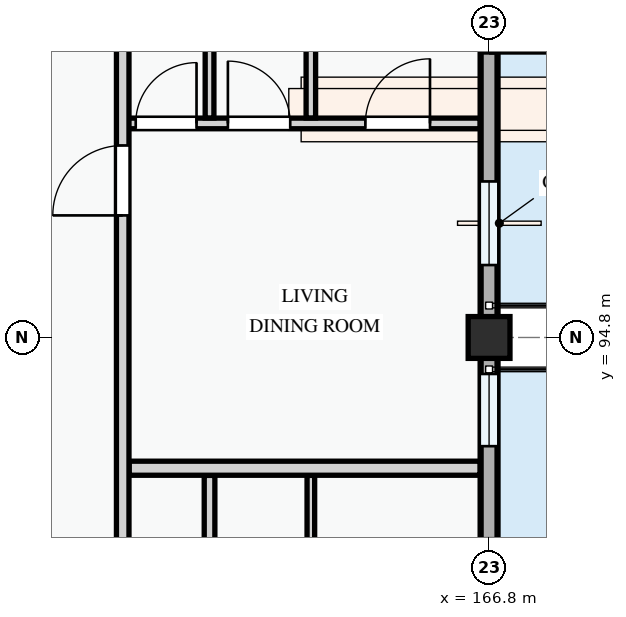
"""IFC4 building model, lengths in metres.
Left out: names, types, materials, properties, quantities, classifications, styles, units other than length and angle.
Written with IfcOpenShell. Run it as: python <this file> out.ifc"""

import sys

from ifc_helpers import new_model, si_unit, direction, frame, frame_2d, origin, origin_2d, place, context, subcontext, project, spatial, polyline, rectangle, outline, extrude, element, fill, save


model = new_model("IFC4")
c1 = context("Model", 3, precision=1e-05, world=origin(), true_north=direction((0.0, 1.0)))
c2 = subcontext(c1, "Body", "Model", "MODEL_VIEW")
j1 = project(units=[si_unit("LENGTHUNIT", "METRE"), si_unit("PLANEANGLEUNIT", "RADIAN")], contexts=[c1])
p1 = place(None, origin())
s1 = spatial("IfcSite", under=j1, at=p1, CompositionType="ELEMENT")
p2 = place(p1, origin())
s2 = spatial("IfcBuilding", under=s1, at=p2, CompositionType="ELEMENT")
p3 = place(p2, frame((0.0, 0.0, 41.1)))
s3 = spatial("IfcBuildingStorey", under=s2, at=p3, CompositionType="ELEMENT", Elevation=41.1)
p4 = place(p3, frame((166.8, 94.8, 0.0), z_axis=(0.0, 0.0, 1.0), x_axis=(1.0, 0.0, 0.0)))
e1 = element("IfcColumn", 1, at=p4, inside=s3, PredefinedType="COLUMN", context=c2, shape_type="SweptSolid", body=[
    extrude(rectangle(XDim=0.55, YDim=0.55, at=origin_2d()), origin(), (0.0, 0.0, 1.0), 3.3),
])
p5 = place(p3, frame((166.8, 86.4, 0.0), z_axis=(0.0, 0.0, 1.0), x_axis=(0.0, 1.0, 0.0)))
e2 = element("IfcWall", 2, at=p5, inside=s3, PredefinedType="STANDARD", context=c2, shape_type="SweptSolid", body=[
    extrude(rectangle(XDim=8.4, YDim=0.235, at=frame_2d((4.2, 0.0))), origin(), (0.0, 0.0, 1.0), 2.345),
])
p6 = place(p5, frame((4.159, 0.0, 0.0)))
e3 = element("IfcOpeningElement", 3, at=p6, cuts=e2, PredefinedType="OPENING", context=c2, shape_type="SweptSolid", body=[
    extrude(rectangle(XDim=1.6, YDim=2.2, at=frame_2d((0.8, 1.1))), frame((0.0, 0.127, 0.0), z_axis=(0.0, -1.0, 0.0), x_axis=(1.0, 0.0, 0.0)), (0.0, 0.0, 1.0), 0.255),
])
p7 = place(p5, frame((1.064, 0.0, 0.78)))
e4 = element("IfcOpeningElement", 4, at=p7, cuts=e2, PredefinedType="OPENING", context=c2, shape_type="SweptSolid", body=[
    extrude(rectangle(XDim=1.3, YDim=1.4, at=frame_2d((0.65, 0.7))), frame((0.0, 0.127, 0.0), z_axis=(0.0, -1.0, 0.0), x_axis=(1.0, 0.0, 0.0)), (0.0, 0.0, 1.0), 0.255),
])
p8 = place(p5, frame((6.97, 0.0, 0.78)))
e5 = element("IfcOpeningElement", 5, at=p8, cuts=e2, PredefinedType="OPENING", context=c2, shape_type="SweptSolid", body=[
    extrude(rectangle(XDim=0.95, YDim=1.15, at=frame_2d((0.475, 0.575))), frame((0.0, 0.127, 0.0), z_axis=(0.0, -1.0, 0.0), x_axis=(1.0, 0.0, 0.0)), (0.0, 0.0, 1.0), 0.255),
])
p9 = place(p3, frame((166.8, 94.8, 0.0), z_axis=(0.0, 0.0, 1.0), x_axis=(0.0, 1.0, 0.0)))
e6 = element("IfcWall", 6, at=p9, inside=s3, PredefinedType="STANDARD", context=c2, shape_type="SweptSolid", body=[
    extrude(rectangle(XDim=6.0, YDim=0.235, at=frame_2d((3.0, 0.0))), origin(), (0.0, 0.0, 1.0), 2.445),
])
p10 = place(p9, frame((3.738, 0.0, 0.0)))
e7 = element("IfcOpeningElement", 7, at=p10, cuts=e6, PredefinedType="OPENING", context=c2, shape_type="SweptSolid", body=[
    extrude(rectangle(XDim=1.05, YDim=2.15, at=frame_2d((0.525, 1.075))), frame((0.0, 0.127, 0.0), z_axis=(0.0, -1.0, 0.0), x_axis=(1.0, 0.0, 0.0)), (0.0, 0.0, 1.0), 0.255),
])
p11 = place(p9, frame((0.953, 0.0, 0.78)))
e8 = element("IfcOpeningElement", 8, at=p11, cuts=e6, PredefinedType="OPENING", context=c2, shape_type="SweptSolid", body=[
    extrude(rectangle(XDim=1.1, YDim=1.3, at=frame_2d((0.55, 0.65))), frame((0.0, 0.127, 0.0), z_axis=(0.0, -1.0, 0.0), x_axis=(1.0, 0.0, 0.0)), (0.0, 0.0, 1.0), 0.255),
])
p12 = place(p3, frame((166.8, 86.4, 3.3), z_axis=(0.0, 0.0, 1.0), x_axis=(0.0, 1.0, 0.0)))
e9 = element("IfcWall", 9, at=p12, inside=s3, PredefinedType="PARAPET", context=c2, shape_type="SweptSolid", body=[
    extrude(outline(polyline([(0.0, 0.0), (8.4, 0.0), (8.4, 1.12), (7.7, 1.322), (7.0, 1.485), (6.3, 1.618), (5.6, 1.718), (4.9, 1.779), (4.2, 1.8), (3.5, 1.779), (2.8, 1.718), (2.1, 1.618), (1.4, 1.485), (0.7, 1.322), (0.0, 1.12), (0.0, 0.0)])), frame((0.0, 0.105, 0.0), z_axis=(0.0, -1.0, 0.0), x_axis=(1.0, 0.0, 0.0)), (0.0, 0.0, 1.0), 0.21),
])
p13 = place(p3, frame((166.8, 94.8, 3.3), z_axis=(0.0, 0.0, 1.0), x_axis=(0.0, 1.0, 0.0)))
e10 = element("IfcWall", 10, at=p13, inside=s3, PredefinedType="PARAPET", context=c2, shape_type="SweptSolid", body=[
    extrude(outline(polyline([(0.0, 0.0), (6.0, 0.0), (6.0, 1.12), (5.5, 1.322), (5.0, 1.485), (4.5, 1.618), (4.0, 1.718), (3.5, 1.779), (3.0, 1.8), (2.5, 1.779), (2.0, 1.718), (1.5, 1.618), (1.0, 1.485), (0.5, 1.322), (0.0, 1.12), (0.0, 0.0)])), frame((0.0, 0.105, 0.0), z_axis=(0.0, -1.0, 0.0), x_axis=(1.0, 0.0, 0.0)), (0.0, 0.0, 1.0), 0.21),
])
p14 = place(p3, frame((164.455, 89.697, 0.0), z_axis=(0.0, 0.0, 1.0), x_axis=(0.0, 1.0, 0.0)))
e11 = element("IfcWall", 11, at=p14, inside=s3, PredefinedType="PARTITIONING", context=c2, shape_type="SweptSolid", body=[
    extrude(rectangle(XDim=3.289, YDim=0.1, at=frame_2d((1.644, 0.0))), origin(), (0.0, 0.0, 1.0), 3.0),
])
p15 = place(p3, frame((163.122, 89.697, 0.0), z_axis=(0.0, 0.0, 1.0), x_axis=(0.0, 1.0, 0.0)))
e12 = element("IfcWall", 12, at=p15, inside=s3, PredefinedType="PARTITIONING", context=c2, shape_type="SweptSolid", body=[
    extrude(rectangle(XDim=3.289, YDim=0.14, at=frame_2d((1.644, 0.0))), origin(), (0.0, 0.0, 1.0), 3.0),
])
p16 = place(p3, frame((161.98, 97.616, 0.0), z_axis=(0.0, 0.0, 1.0), x_axis=(1.0, 0.0, 0.0)))
e13 = element("IfcWall", 13, at=p16, inside=s3, PredefinedType="PARTITIONING", context=c2, shape_type="SweptSolid", body=[
    extrude(rectangle(XDim=4.7, YDim=0.14, at=frame_2d((2.35, 0.0))), origin(), (0.0, 0.0, 1.0), 3.0),
])
p17 = place(p16, frame((0.171, 0.0, 0.0)))
e14 = element("IfcOpeningElement", 14, at=p17, cuts=e13, PredefinedType="OPENING", context=c2, shape_type="SweptSolid", body=[
    extrude(rectangle(XDim=0.8, YDim=2.1, at=frame_2d((0.4, 1.05))), frame((0.0, 0.08, 0.0), z_axis=(0.0, -1.0, 0.0), x_axis=(1.0, 0.0, 0.0)), (0.0, 0.0, 1.0), 0.16),
])
p18 = place(p16, frame((1.384, 0.0, 0.0)))
e15 = element("IfcOpeningElement", 15, at=p18, cuts=e13, PredefinedType="OPENING", context=c2, shape_type="SweptSolid", body=[
    extrude(rectangle(XDim=0.82, YDim=2.08, at=frame_2d((0.41, 1.04))), frame((0.0, 0.08, 0.0), z_axis=(0.0, -1.0, 0.0), x_axis=(1.0, 0.0, 0.0)), (0.0, 0.0, 1.0), 0.16),
])
p19 = place(p16, frame((3.193, 0.0, 0.0)))
e16 = element("IfcOpeningElement", 16, at=p19, cuts=e13, PredefinedType="OPENING", context=c2, shape_type="SweptSolid", body=[
    extrude(rectangle(XDim=0.85, YDim=2.1, at=frame_2d((0.425, 1.05))), frame((0.0, 0.08, 0.0), z_axis=(0.0, -1.0, 0.0), x_axis=(1.0, 0.0, 0.0)), (0.0, 0.0, 1.0), 0.16),
])
p20 = place(p3, frame((164.455, 97.688, 0.0), z_axis=(0.0, 0.0, 1.0), x_axis=(0.0, 1.0, 0.0)))
e17 = element("IfcWall", 17, at=p20, inside=s3, PredefinedType="PARTITIONING", context=c2, shape_type="SweptSolid", body=[
    extrude(rectangle(XDim=4.73, YDim=0.125, at=frame_2d((2.365, 0.0))), origin(), (0.0, 0.0, 1.0), 3.0),
])
p21 = place(p3, frame((163.122, 97.688, 0.0), z_axis=(0.0, 0.0, 1.0), x_axis=(0.0, 1.0, 0.0)))
e18 = element("IfcWall", 18, at=p21, inside=s3, PredefinedType="PARTITIONING", context=c2, shape_type="SweptSolid", body=[
    extrude(rectangle(XDim=4.73, YDim=0.115, at=frame_2d((2.365, 0.0))), origin(), (0.0, 0.0, 1.0), 3.0),
])
p22 = place(p3, frame((162.064, 93.08, 0.0), z_axis=(0.0, 0.0, 1.0), x_axis=(1.0, 0.0, 0.0)))
e19 = element("IfcWall", 19, at=p22, inside=s3, PredefinedType="PARTITIONING", context=c2, shape_type="SweptSolid", body=[
    extrude(rectangle(XDim=4.616, YDim=0.185, at=frame_2d((2.308, 0.0))), origin(), (0.0, 0.0, 1.0), 3.0),
])
p23 = place(p3, frame((161.98, 86.52, 0.0), z_axis=(0.0, 0.0, 1.0), x_axis=(0.0, 1.0, 0.0)))
e20 = element("IfcWall", 20, at=p23, inside=s3, PredefinedType="PARTITIONING", context=c2, shape_type="SweptSolid", body=[
    extrude(rectangle(XDim=22.821, YDim=0.165, at=frame_2d((11.41, 0.0))), origin(), (0.0, 0.0, 1.0), 3.0),
])
p24 = place(p23, frame((1.908, 0.0, 0.0)))
e21 = element("IfcOpeningElement", 21, at=p24, cuts=e20, PredefinedType="OPENING", context=c2, shape_type="SweptSolid", body=[
    extrude(rectangle(XDim=0.92, YDim=2.1, at=frame_2d((0.46, 1.05))), frame((0.0, 0.093, 0.0), z_axis=(0.0, -1.0, 0.0), x_axis=(1.0, 0.0, 0.0)), (0.0, 0.0, 1.0), 0.185),
])
p25 = place(p23, frame((9.886, 0.0, 0.0)))
e22 = element("IfcOpeningElement", 22, at=p25, cuts=e20, PredefinedType="OPENING", context=c2, shape_type="SweptSolid", body=[
    extrude(rectangle(XDim=0.92, YDim=2.1, at=frame_2d((0.46, 1.05))), frame((0.0, 0.093, 0.0), z_axis=(0.0, -1.0, 0.0), x_axis=(1.0, 0.0, 0.0)), (0.0, 0.0, 1.0), 0.185),
])
p26 = place(p23, frame((18.013, 0.0, 0.0)))
e23 = element("IfcOpeningElement", 23, at=p26, cuts=e20, PredefinedType="OPENING", context=c2, shape_type="SweptSolid", body=[
    extrude(rectangle(XDim=0.92, YDim=2.1, at=frame_2d((0.46, 1.05))), frame((0.0, 0.093, 0.0), z_axis=(0.0, -1.0, 0.0), x_axis=(1.0, 0.0, 0.0)), (0.0, 0.0, 1.0), 0.185),
])
p27 = place(p8, origin())
e24 = element("IfcWindow", 24, at=p27, inside=s3, PartitioningType="SINGLE_PANEL", PredefinedType="WINDOW", context=c2, shape_type="SweptSolid", body=[
    extrude(rectangle(XDim=0.95, YDim=1.15, at=frame_2d((0.475, 0.575))), frame((0.0, 0.03, 0.0), z_axis=(0.0, -1.0, 0.0), x_axis=(1.0, 0.0, 0.0)), (0.0, 0.0, 1.0), 0.06),
])
fill(e5, e24)
p28 = place(p10, frame((1.05, 0.0, 0.0), z_axis=(0.0, 0.0, 1.0), x_axis=(-1.0, 0.0, 0.0)))
e25 = element("IfcDoor", 25, at=p28, inside=s3, OperationType="SINGLE_SWING_RIGHT", PredefinedType="DOOR", context=c2, shape_type="SweptSolid", body=[
    extrude(rectangle(XDim=1.05, YDim=2.15, at=frame_2d((0.525, 1.075))), frame((0.0, 0.025, 0.0), z_axis=(0.0, -1.0, 0.0), x_axis=(1.0, 0.0, 0.0)), (0.0, 0.0, 1.0), 0.05),
])
fill(e7, e25)
p29 = place(p11, origin())
e26 = element("IfcWindow", 26, at=p29, inside=s3, PartitioningType="SINGLE_PANEL", PredefinedType="WINDOW", context=c2, shape_type="SweptSolid", body=[
    extrude(rectangle(XDim=1.1, YDim=1.3, at=frame_2d((0.55, 0.65))), frame((0.0, 0.03, 0.0), z_axis=(0.0, -1.0, 0.0), x_axis=(1.0, 0.0, 0.0)), (0.0, 0.0, 1.0), 0.06),
])
fill(e8, e26)
p30 = place(p17, origin())
e27 = element("IfcDoor", 27, at=p30, inside=s3, OperationType="SINGLE_SWING_RIGHT", PredefinedType="DOOR", context=c2, shape_type="SweptSolid", body=[
    extrude(rectangle(XDim=0.8, YDim=2.1, at=frame_2d((0.4, 1.05))), frame((0.0, 0.025, 0.0), z_axis=(0.0, -1.0, 0.0), x_axis=(1.0, 0.0, 0.0)), (0.0, 0.0, 1.0), 0.05),
])
fill(e14, e27)
p31 = place(p18, origin())
e28 = element("IfcDoor", 28, at=p31, inside=s3, OperationType="SINGLE_SWING_LEFT", PredefinedType="DOOR", context=c2, shape_type="SweptSolid", body=[
    extrude(rectangle(XDim=0.82, YDim=2.08, at=frame_2d((0.41, 1.04))), frame((0.0, 0.025, 0.0), z_axis=(0.0, -1.0, 0.0), x_axis=(1.0, 0.0, 0.0)), (0.0, 0.0, 1.0), 0.05),
])
fill(e15, e28)
p32 = place(p19, origin())
e29 = element("IfcDoor", 29, at=p32, inside=s3, OperationType="SINGLE_SWING_RIGHT", PredefinedType="DOOR", context=c2, shape_type="SweptSolid", body=[
    extrude(rectangle(XDim=0.85, YDim=2.1, at=frame_2d((0.425, 1.05))), frame((0.0, 0.025, 0.0), z_axis=(0.0, -1.0, 0.0), x_axis=(1.0, 0.0, 0.0)), (0.0, 0.0, 1.0), 0.05),
])
fill(e16, e29)
p33 = place(p25, origin())
e30 = element("IfcDoor", 30, at=p33, inside=s3, OperationType="SINGLE_SWING_LEFT", PredefinedType="DOOR", context=c2, shape_type="SweptSolid", body=[
    extrude(rectangle(XDim=0.92, YDim=2.1, at=frame_2d((0.46, 1.05))), frame((0.0, 0.025, 0.0), z_axis=(0.0, -1.0, 0.0), x_axis=(1.0, 0.0, 0.0)), (0.0, 0.0, 1.0), 0.05),
])
fill(e22, e30)
save(model, sys.argv[1])
